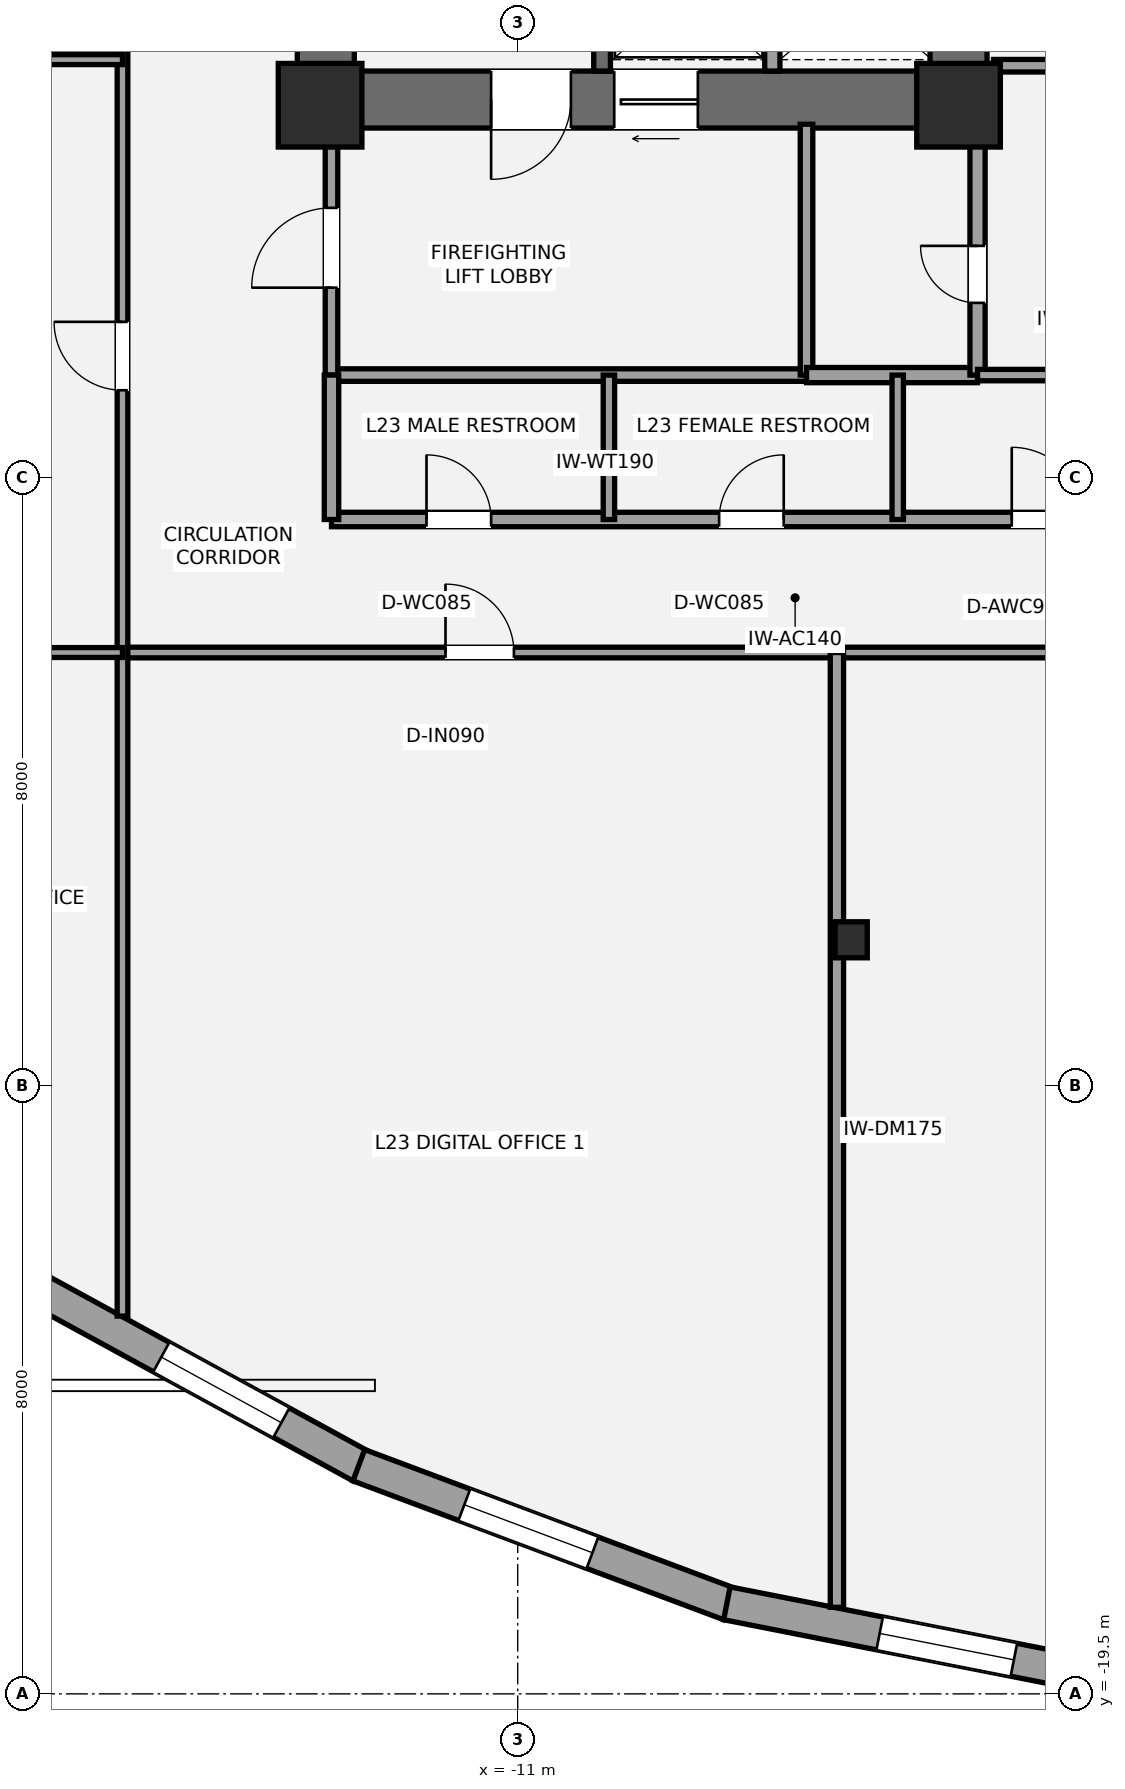
"""IFC4 building model, lengths in metres.
Left out: names, types, materials, properties, quantities, classifications, styles, units other than length and angle.
Written with IfcOpenShell. Run it as: python <this file> out.ifc"""

import sys

from ifc_helpers import new_model, si_unit, direction, frame, frame_2d, origin, origin_2d, place, context, subcontext, project, spatial, rectangle, i_section, extrude, element, fill, save


model = new_model("IFC4")
c1 = context("Model", 3, precision=1e-05, world=origin(), true_north=direction((0.0, 1.0)))
c2 = subcontext(c1, "Body", "Model", "MODEL_VIEW")
j1 = project(units=[si_unit("LENGTHUNIT", "METRE"), si_unit("PLANEANGLEUNIT", "RADIAN")], contexts=[c1])
p1 = place(None, origin())
s1 = spatial("IfcSite", under=j1, at=p1, CompositionType="ELEMENT")
p2 = place(p1, origin())
s2 = spatial("IfcBuilding", under=s1, at=p2, CompositionType="ELEMENT")
p3 = place(p2, frame((0.0, 0.0, 89.6)))
s3 = spatial("IfcBuildingStorey", under=s2, at=p3, CompositionType="ELEMENT", Elevation=89.6)
p4 = place(p3, frame((-13.525, 1.1, 0.0), z_axis=(0.0, 0.0, 1.0), x_axis=(0.0, 1.0, 0.0)))
e1 = element("IfcWall", 1, at=p4, inside=s3, PredefinedType="SHEAR", context=c2, shape_type="SweptSolid", body=[
    extrude(rectangle(XDim=8.65, YDim=0.75, at=frame_2d((4.325, 0.0))), origin(), (0.0, 0.0, 1.0), 3.5),
])
p5 = place(p3, frame((-4.825, 1.475, 0.0), z_axis=(0.0, 0.0, 1.0), x_axis=(-1.0, 0.0, 0.0)))
e2 = element("IfcWall", 2, at=p5, inside=s3, PredefinedType="SHEAR", context=c2, shape_type="SweptSolid", body=[
    extrude(rectangle(XDim=9.075, YDim=0.75, at=frame_2d((4.538, 0.0))), origin(), (0.0, 0.0, 1.0), 3.5),
])
p6 = place(p5, frame((5.475, 0.0, 0.0)))
e3 = element("IfcOpeningElement", 3, at=p6, cuts=e2, PredefinedType="OPENING", context=c2, shape_type="SweptSolid", body=[
    extrude(rectangle(XDim=1.05, YDim=2.15, at=frame_2d((0.525, 1.075))), frame((0.0, 0.385, 0.0), z_axis=(0.0, -1.0, 0.0), x_axis=(1.0, 0.0, 0.0)), (0.0, 0.0, 1.0), 0.77),
])
p7 = place(p5, frame((3.805, 0.0, 0.0)))
e4 = element("IfcOpeningElement", 4, at=p7, cuts=e2, PredefinedType="OPENING", context=c2, shape_type="SweptSolid", body=[
    extrude(rectangle(XDim=1.1, YDim=2.2, at=frame_2d((0.55, 1.1))), frame((0.0, 0.385, 0.0), z_axis=(0.0, -1.0, 0.0), x_axis=(1.0, 0.0, 0.0)), (0.0, 0.0, 1.0), 0.77),
])
p8 = place(p3, frame((-5.2, 1.1, 0.0), z_axis=(0.0, 0.0, 1.0), x_axis=(0.0, 1.0, 0.0)))
e5 = element("IfcWall", 5, at=p8, inside=s3, PredefinedType="SHEAR", context=c2, shape_type="SweptSolid", body=[
    extrude(rectangle(XDim=2.7, YDim=0.75, at=frame_2d((1.35, 0.0))), origin(), (0.0, 0.0, 1.0), 3.5),
])
p9 = place(p3, frame((-9.89, 1.85, 0.0), z_axis=(0.0, 0.0, 1.0), x_axis=(0.0, 1.0, 0.0)))
e6 = element("IfcWall", 6, at=p9, inside=s3, PredefinedType="SHEAR", context=c2, shape_type="SweptSolid", body=[
    extrude(rectangle(XDim=7.15, YDim=0.22, at=frame_2d((3.575, 0.0))), origin(), (0.0, 0.0, 1.0), 3.5),
])
for number, where, z_axis, x_axis in (
    (7, (-13.6, 1.4, 0.0), (0.0, 0.0, 1.0), (1.0, 0.0, 0.0)),
    (8, (-5.2, 1.4, 0.0), (0.0, 0.0, 1.0), (1.0, 0.0, 0.0)),
):
    element("IfcColumn", number, at=place(p3, frame(where, z_axis=z_axis, x_axis=x_axis)), inside=s3, PredefinedType="COLUMN", context=c2, shape_type="SweptSolid", body=[
        extrude(rectangle(XDim=1.1, YDim=1.1, at=origin_2d()), origin(), (0.0, 0.0, 1.0), 3.5),
    ])
p10 = place(p3, frame((-6.613, -9.579, 0.0), z_axis=(0.0, 0.0, 1.0), x_axis=(1.0, 0.0, 0.0)))
e9 = element("IfcColumn", 9, at=p10, inside=s3, PredefinedType="COLUMN", context=c2, shape_type="SweptSolid", body=[
    extrude(i_section(OverallWidth=0.424, OverallDepth=0.474, WebThickness=0.048, FlangeThickness=0.077, at=origin_2d()), origin(), (0.0, 0.0, 1.0), 3.5),
])
p11 = place(p3, frame((-13.062, -16.505, 0.0), z_axis=(0.0, 0.0, 1.0), x_axis=(-0.877445532469, 0.479676284123, 0.0)))
e10 = element("IfcWall", 10, at=p11, inside=s3, PredefinedType="STANDARD", context=c2, shape_type="SweptSolid", body=[
    extrude(rectangle(XDim=4.835, YDim=0.44, at=frame_2d((2.417, 0.0))), origin(), (0.0, 0.0, 1.0), 2.528),
])
p12 = place(p11, frame((1.194, 0.0, 0.65)))
e11 = element("IfcOpeningElement", 11, at=p12, cuts=e10, PredefinedType="OPENING", context=c2, shape_type="SweptSolid", body=[
    extrude(rectangle(XDim=1.8, YDim=1.7, at=frame_2d((0.9, 0.85))), frame((0.0, 0.23, 0.0), z_axis=(0.0, -1.0, 0.0), x_axis=(1.0, 0.0, 0.0)), (0.0, 0.0, 1.0), 0.46),
])
p13 = place(p3, frame((-8.213, -18.319, 0.0), z_axis=(0.0, 0.0, 1.0), x_axis=(-0.936473584013, 0.350738116613, 0.0)))
e12 = element("IfcWall", 12, at=p13, inside=s3, PredefinedType="STANDARD", context=c2, shape_type="SweptSolid", body=[
    extrude(rectangle(XDim=5.208, YDim=0.44, at=frame_2d((2.604, 0.0))), origin(), (0.0, 0.0, 1.0), 2.528),
])
p14 = place(p13, frame((1.926, 0.0, 0.65)))
e13 = element("IfcOpeningElement", 13, at=p14, cuts=e12, PredefinedType="OPENING", context=c2, shape_type="SweptSolid", body=[
    extrude(rectangle(XDim=1.8, YDim=1.7, at=frame_2d((0.9, 0.85))), frame((0.0, 0.23, 0.0), z_axis=(0.0, -1.0, 0.0), x_axis=(1.0, 0.0, 0.0)), (0.0, 0.0, 1.0), 0.46),
])
p15 = place(p3, frame((-2.805, -19.38, 0.0), z_axis=(0.0, 0.0, 1.0), x_axis=(-0.981185300561, 0.19306839711, 0.0)))
e14 = element("IfcWall", 14, at=p15, inside=s3, PredefinedType="STANDARD", context=c2, shape_type="SweptSolid", body=[
    extrude(rectangle(XDim=5.548, YDim=0.44, at=frame_2d((2.774, 0.0))), origin(), (0.0, 0.0, 1.0), 2.528),
])
p16 = place(p15, frame((1.699, 0.0, 0.65)))
e15 = element("IfcOpeningElement", 15, at=p16, cuts=e14, PredefinedType="OPENING", context=c2, shape_type="SweptSolid", body=[
    extrude(rectangle(XDim=1.8, YDim=1.7, at=frame_2d((0.9, 0.85))), frame((0.0, 0.23, 0.0), z_axis=(0.0, -1.0, 0.0), x_axis=(1.0, 0.0, 0.0)), (0.0, 0.0, 1.0), 0.46),
])
p17 = place(p3, frame((-13.45, -2.15, 0.0), z_axis=(0.0, 0.0, 1.0), x_axis=(1.0, 0.0, 0.0)))
e16 = element("IfcWall", 16, at=p17, inside=s3, PredefinedType="PARTITIONING", context=c2, shape_type="SweptSolid", body=[
    extrude(rectangle(XDim=6.25, YDim=0.165, at=frame_2d((3.125, 0.0))), origin(), (0.0, 0.0, 1.0), 3.31),
])
p18 = place(p3, frame((-13.45, -2.15, 0.0), z_axis=(0.0, 0.0, 1.0), x_axis=(0.0, 1.0, 0.0)))
e17 = element("IfcWall", 17, at=p18, inside=s3, PredefinedType="PARTITIONING", context=c2, shape_type="SweptSolid", body=[
    extrude(rectangle(XDim=3.3, YDim=0.165, at=frame_2d((1.65, 0.0))), origin(), (0.0, 0.0, 1.0), 2.763),
])
p19 = place(p18, frame((1.15, 0.0, 0.0)))
e18 = element("IfcOpeningElement", 18, at=p19, cuts=e17, PredefinedType="OPENING", context=c2, shape_type="SweptSolid", body=[
    extrude(rectangle(XDim=1.05, YDim=2.15, at=frame_2d((0.525, 1.075))), frame((0.0, 0.093, 0.0), z_axis=(0.0, -1.0, 0.0), x_axis=(1.0, 0.0, 0.0)), (0.0, 0.0, 1.0), 0.185),
])
p20 = place(p3, frame((-7.2, -2.15, 0.0), z_axis=(0.0, 0.0, 1.0), x_axis=(0.0, 1.0, 0.0)))
e19 = element("IfcWall", 19, at=p20, inside=s3, PredefinedType="PARTITIONING", context=c2, shape_type="SweptSolid", body=[
    extrude(rectangle(XDim=3.3, YDim=0.165, at=frame_2d((1.65, 0.0))), origin(), (0.0, 0.0, 1.0), 2.763),
])
p21 = place(p3, frame((-7.2, -2.15, 0.0), z_axis=(0.0, 0.0, 1.0), x_axis=(1.0, 0.0, 0.0)))
e20 = element("IfcWall", 20, at=p21, inside=s3, PredefinedType="SOLIDWALL", context=c2, shape_type="SweptSolid", body=[
    extrude(rectangle(XDim=2.25, YDim=0.2, at=frame_2d((1.125, 0.0))), origin(), (0.0, 0.0, 1.0), 2.763),
])
p22 = place(p3, frame((-4.95, -2.15, 0.0), z_axis=(0.0, 0.0, 1.0), x_axis=(0.0, 1.0, 0.0)))
e21 = element("IfcWall", 21, at=p22, inside=s3, PredefinedType="SOLIDWALL", context=c2, shape_type="SweptSolid", body=[
    extrude(rectangle(XDim=3.3, YDim=0.2, at=frame_2d((1.65, 0.0))), origin(), (0.0, 0.0, 1.0), 2.763),
])
p23 = place(p22, frame((0.95, 0.0, 0.0)))
e22 = element("IfcOpeningElement", 22, at=p23, cuts=e21, PredefinedType="OPENING", context=c2, shape_type="SweptSolid", body=[
    extrude(rectangle(XDim=0.75, YDim=2.1, at=frame_2d((0.375, 1.05))), frame((0.0, 0.11, 0.0), z_axis=(0.0, -1.0, 0.0), x_axis=(1.0, 0.0, 0.0)), (0.0, 0.0, 1.0), 0.22),
])
p24 = place(p3, frame((-7.65, 1.85, 0.0), z_axis=(0.0, 0.0, 1.0), x_axis=(0.0, 1.0, 0.0)))
e23 = element("IfcWall", 23, at=p24, inside=s3, PredefinedType="SOLIDWALL", context=c2, shape_type="SweptSolid", body=[
    extrude(rectangle(XDim=1.93, YDim=0.2, at=frame_2d((0.965, 0.0))), origin(), (0.0, 0.0, 1.0), 3.31),
])
p25 = place(p3, frame((-4.74, 1.92, 0.0), z_axis=(0.0, 0.0, 1.0), x_axis=(1.0, 0.0, 0.0)))
e24 = element("IfcWall", 24, at=p25, inside=s3, PredefinedType="PARTITIONING", context=c2, shape_type="SweptSolid", body=[
    extrude(rectangle(XDim=3.89, YDim=0.165, at=frame_2d((1.945, 0.0))), origin(), (0.0, 0.0, 1.0), 2.3),
])
p26 = place(p3, frame((-13.45, -4.05, 0.0), z_axis=(0.0, 0.0, 1.0), x_axis=(1.0, 0.0, 0.0)))
e25 = element("IfcWall", 25, at=p26, inside=s3, PredefinedType="PLUMBINGWALL", context=c2, shape_type="SweptSolid", body=[
    extrude(rectangle(XDim=11.35, YDim=0.19, at=frame_2d((5.675, 0.0))), origin(), (0.0, 0.0, 1.0), 2.763),
])
p27 = place(p26, frame((1.25, 0.0, 0.0)))
e26 = element("IfcOpeningElement", 26, at=p27, cuts=e25, PredefinedType="OPENING", context=c2, shape_type="SweptSolid", body=[
    extrude(rectangle(XDim=0.85, YDim=2.1, at=frame_2d((0.425, 1.05))), frame((0.0, 0.105, 0.0), z_axis=(0.0, -1.0, 0.0), x_axis=(1.0, 0.0, 0.0)), (0.0, 0.0, 1.0), 0.21),
])
p28 = place(p26, frame((5.1, 0.0, 0.0)))
e27 = element("IfcOpeningElement", 27, at=p28, cuts=e25, PredefinedType="OPENING", context=c2, shape_type="SweptSolid", body=[
    extrude(rectangle(XDim=0.85, YDim=2.1, at=frame_2d((0.425, 1.05))), frame((0.0, 0.105, 0.0), z_axis=(0.0, -1.0, 0.0), x_axis=(1.0, 0.0, 0.0)), (0.0, 0.0, 1.0), 0.21),
])
p29 = place(p26, frame((8.95, 0.0, 0.0)))
e28 = element("IfcOpeningElement", 28, at=p29, cuts=e25, PredefinedType="OPENING", context=c2, shape_type="SweptSolid", body=[
    extrude(rectangle(XDim=0.95, YDim=2.15, at=frame_2d((0.475, 1.075))), frame((0.0, 0.105, 0.0), z_axis=(0.0, -1.0, 0.0), x_axis=(1.0, 0.0, 0.0)), (0.0, 0.0, 1.0), 0.21),
])
p30 = place(p3, frame((-4.95, -2.15, 0.0), z_axis=(0.0, 0.0, 1.0), x_axis=(1.0, 0.0, 0.0)))
e29 = element("IfcWall", 29, at=p30, inside=s3, PredefinedType="PLUMBINGWALL", context=c2, shape_type="SweptSolid", body=[
    extrude(rectangle(XDim=2.85, YDim=0.15, at=frame_2d((1.425, 0.0))), origin(), (0.0, 0.0, 1.0), 3.31),
])
p31 = place(p3, frame((-13.45, -4.05, 0.0), z_axis=(0.0, 0.0, 1.0), x_axis=(0.0, 1.0, 0.0)))
e30 = element("IfcWall", 30, at=p31, inside=s3, PredefinedType="PLUMBINGWALL", context=c2, shape_type="SweptSolid", body=[
    extrude(rectangle(XDim=1.9, YDim=0.19, at=frame_2d((0.95, 0.0))), origin(), (0.0, 0.0, 1.0), 3.31),
])
p32 = place(p3, frame((-9.8, -4.05, 0.0), z_axis=(0.0, 0.0, 1.0), x_axis=(0.0, 1.0, 0.0)))
e31 = element("IfcWall", 31, at=p32, inside=s3, PredefinedType="PLUMBINGWALL", context=c2, shape_type="SweptSolid", body=[
    extrude(rectangle(XDim=1.9, YDim=0.15, at=frame_2d((0.95, 0.0))), origin(), (0.0, 0.0, 1.0), 3.31),
])
p33 = place(p3, frame((-6.0, -4.05, 0.0), z_axis=(0.0, 0.0, 1.0), x_axis=(0.0, 1.0, 0.0)))
e32 = element("IfcWall", 32, at=p33, inside=s3, PredefinedType="PLUMBINGWALL", context=c2, shape_type="SweptSolid", body=[
    extrude(rectangle(XDim=1.9, YDim=0.15, at=frame_2d((0.95, 0.0))), origin(), (0.0, 0.0, 1.0), 2.751),
])
p34 = place(p3, frame((-16.2, -5.8, 0.0), z_axis=(0.0, 0.0, 1.0), x_axis=(1.0, 0.0, 0.0)))
e33 = element("IfcWall", 33, at=p34, inside=s3, PredefinedType="PARTITIONING", context=c2, shape_type="SweptSolid", body=[
    extrude(rectangle(XDim=32.4, YDim=0.14, at=frame_2d((16.2, 0.0))), origin(), (0.0, 0.0, 1.0), 2.763),
])
p35 = place(p34, frame((4.25, 0.0, 0.0)))
e34 = element("IfcOpeningElement", 34, at=p35, cuts=e33, PredefinedType="OPENING", context=c2, shape_type="SweptSolid", body=[
    extrude(rectangle(XDim=0.9, YDim=2.1, at=frame_2d((0.45, 1.05))), frame((0.0, 0.08, 0.0), z_axis=(0.0, -1.0, 0.0), x_axis=(1.0, 0.0, 0.0)), (0.0, 0.0, 1.0), 0.16),
])
p36 = place(p34, frame((13.15, 0.0, 0.0)))
e35 = element("IfcOpeningElement", 35, at=p36, cuts=e33, PredefinedType="OPENING", context=c2, shape_type="SweptSolid", body=[
    extrude(rectangle(XDim=1.5, YDim=2.15, at=frame_2d((0.75, 1.075))), frame((0.0, 0.08, 0.0), z_axis=(0.0, -1.0, 0.0), x_axis=(1.0, 0.0, 0.0)), (0.0, 0.0, 1.0), 0.16),
])
p37 = place(p34, frame((21.45, 0.0, 0.0)))
e36 = element("IfcOpeningElement", 36, at=p37, cuts=e33, PredefinedType="OPENING", context=c2, shape_type="SweptSolid", body=[
    extrude(rectangle(XDim=0.9, YDim=2.1, at=frame_2d((0.45, 1.05))), frame((0.0, 0.08, 0.0), z_axis=(0.0, -1.0, 0.0), x_axis=(1.0, 0.0, 0.0)), (0.0, 0.0, 1.0), 0.16),
])
p38 = place(p34, frame((28.15, 0.0, 0.0)))
e37 = element("IfcOpeningElement", 37, at=p38, cuts=e33, PredefinedType="OPENING", context=c2, shape_type="SweptSolid", body=[
    extrude(rectangle(XDim=1.5, YDim=2.15, at=frame_2d((0.75, 1.075))), frame((0.0, 0.08, 0.0), z_axis=(0.0, -1.0, 0.0), x_axis=(1.0, 0.0, 0.0)), (0.0, 0.0, 1.0), 0.16),
])
p39 = place(p3, frame((-16.2, -14.53, 0.0), z_axis=(0.0, 0.0, 1.0), x_axis=(0.0, 1.0, 0.0)))
e38 = element("IfcWall", 38, at=p39, inside=s3, PredefinedType="PARTITIONING", context=c2, shape_type="SweptSolid", body=[
    extrude(rectangle(XDim=22.08, YDim=0.14, at=frame_2d((11.04, 0.0))), origin(), (0.0, 0.0, 1.0), 2.751),
])
p40 = place(p39, frame((12.18, 0.0, 0.0)))
e39 = element("IfcOpeningElement", 39, at=p40, cuts=e38, PredefinedType="OPENING", context=c2, shape_type="SweptSolid", body=[
    extrude(rectangle(XDim=0.9, YDim=2.1, at=frame_2d((0.45, 1.05))), frame((0.0, 0.08, 0.0), z_axis=(0.0, -1.0, 0.0), x_axis=(1.0, 0.0, 0.0)), (0.0, 0.0, 1.0), 0.16),
])
p41 = place(p39, frame((18.855, 0.0, 0.0)))
e40 = element("IfcOpeningElement", 40, at=p41, cuts=e38, PredefinedType="OPENING", context=c2, shape_type="SweptSolid", body=[
    extrude(rectangle(XDim=0.9, YDim=2.1, at=frame_2d((0.45, 1.05))), frame((0.0, 0.08, 0.0), z_axis=(0.0, -1.0, 0.0), x_axis=(1.0, 0.0, 0.0)), (0.0, 0.0, 1.0), 0.16),
])
p42 = place(p3, frame((-6.8, -18.361, 0.0), z_axis=(0.0, 0.0, 1.0), x_axis=(0.0, 1.0, 0.0)))
e41 = element("IfcWall", 41, at=p42, inside=s3, PredefinedType="PARTITIONING", context=c2, shape_type="SweptSolid", body=[
    extrude(rectangle(XDim=12.561, YDim=0.175, at=frame_2d((6.281, 0.0))), origin(), (0.0, 0.0, 1.0), 2.751),
])
p43 = place(p3, frame((-26.604, -5.8, 0.0), z_axis=(0.0, 0.0, 1.0), x_axis=(1.0, 0.0, 0.0)))
e42 = element("IfcWall", 42, at=p43, inside=s3, PredefinedType="PARTITIONING", context=c2, shape_type="SweptSolid", body=[
    extrude(rectangle(XDim=10.404, YDim=0.13, at=frame_2d((5.202, 0.0))), origin(), (0.0, 0.0, 1.0), 2.688),
])
p44 = place(p43, frame((0.75, 0.0, 0.0)))
e43 = element("IfcOpeningElement", 43, at=p44, cuts=e42, PredefinedType="OPENING", context=c2, shape_type="SweptSolid", body=[
    extrude(rectangle(XDim=0.9, YDim=2.1, at=frame_2d((0.45, 1.05))), frame((0.0, 0.075, 0.0), z_axis=(0.0, -1.0, 0.0), x_axis=(1.0, 0.0, 0.0)), (0.0, 0.0, 1.0), 0.15),
])
p45 = place(p3, frame((-28.392, 2.0, 0.0), z_axis=(0.0, 0.0, 1.0), x_axis=(1.0, 0.0, 0.0)))
e44 = element("IfcWall", 44, at=p45, inside=s3, PredefinedType="PARTITIONING", context=c2, shape_type="SweptSolid", body=[
    extrude(rectangle(XDim=12.192, YDim=0.13, at=frame_2d((6.096, 0.0))), origin(), (0.0, 0.0, 1.0), 2.751),
])
p46 = place(p12, origin())
e45 = element("IfcWindow", 45, at=p46, inside=s3, PartitioningType="SINGLE_PANEL", PredefinedType="WINDOW", context=c2, shape_type="SweptSolid", body=[
    extrude(rectangle(XDim=1.8, YDim=1.7, at=frame_2d((0.9, 0.85))), frame((0.0, -0.01, 0.0), z_axis=(0.0, -1.0, 0.0), x_axis=(1.0, 0.0, 0.0)), (0.0, 0.0, 1.0), 0.06),
])
fill(e11, e45)
p47 = place(p14, origin())
e46 = element("IfcWindow", 46, at=p47, inside=s3, PartitioningType="SINGLE_PANEL", PredefinedType="WINDOW", context=c2, shape_type="SweptSolid", body=[
    extrude(rectangle(XDim=1.8, YDim=1.7, at=frame_2d((0.9, 0.85))), frame((0.0, -0.01, 0.0), z_axis=(0.0, -1.0, 0.0), x_axis=(1.0, 0.0, 0.0)), (0.0, 0.0, 1.0), 0.06),
])
fill(e13, e46)
p48 = place(p16, origin())
e47 = element("IfcWindow", 47, at=p48, inside=s3, PartitioningType="SINGLE_PANEL", PredefinedType="WINDOW", context=c2, shape_type="SweptSolid", body=[
    extrude(rectangle(XDim=1.8, YDim=1.7, at=frame_2d((0.9, 0.85))), frame((0.0, -0.01, 0.0), z_axis=(0.0, -1.0, 0.0), x_axis=(1.0, 0.0, 0.0)), (0.0, 0.0, 1.0), 0.06),
])
fill(e15, e47)
p49 = place(p6, origin())
e48 = element("IfcDoor", 48, at=p49, inside=s3, OperationType="SINGLE_SWING_RIGHT", PredefinedType="DOOR", context=c2, shape_type="SweptSolid", body=[
    extrude(rectangle(XDim=1.05, YDim=2.15, at=frame_2d((0.525, 1.075))), frame((0.0, 0.025, 0.0), z_axis=(0.0, -1.0, 0.0), x_axis=(1.0, 0.0, 0.0)), (0.0, 0.0, 1.0), 0.05),
])
fill(e3, e48)
p50 = place(p19, origin())
e49 = element("IfcDoor", 49, at=p50, inside=s3, OperationType="SINGLE_SWING_LEFT", PredefinedType="DOOR", context=c2, shape_type="SweptSolid", body=[
    extrude(rectangle(XDim=1.05, YDim=2.15, at=frame_2d((0.525, 1.075))), frame((0.0, 0.025, 0.0), z_axis=(0.0, -1.0, 0.0), x_axis=(1.0, 0.0, 0.0)), (0.0, 0.0, 1.0), 0.05),
])
fill(e18, e49)
p51 = place(p23, origin())
e50 = element("IfcDoor", 50, at=p51, inside=s3, OperationType="SINGLE_SWING_RIGHT", PredefinedType="DOOR", context=c2, shape_type="SweptSolid", body=[
    extrude(rectangle(XDim=0.75, YDim=2.1, at=frame_2d((0.375, 1.05))), frame((0.0, 0.025, 0.0), z_axis=(0.0, -1.0, 0.0), x_axis=(1.0, 0.0, 0.0)), (0.0, 0.0, 1.0), 0.05),
])
fill(e22, e50)
p52 = place(p7, origin())
e51 = element("IfcDoor", 51, at=p52, inside=s3, OperationType="SLIDING_TO_LEFT", PredefinedType="DOOR", context=c2, shape_type="SweptSolid", body=[
    extrude(rectangle(XDim=1.1, YDim=2.2, at=frame_2d((0.55, 1.1))), frame((0.0, 0.025, 0.0), z_axis=(0.0, -1.0, 0.0), x_axis=(1.0, 0.0, 0.0)), (0.0, 0.0, 1.0), 0.05),
])
fill(e4, e51)
p53 = place(p27, origin())
e52 = element("IfcDoor", 52, at=p53, inside=s3, OperationType="SINGLE_SWING_LEFT", PredefinedType="DOOR", context=c2, shape_type="SweptSolid", body=[
    extrude(rectangle(XDim=0.85, YDim=2.1, at=frame_2d((0.425, 1.05))), frame((0.0, 0.025, 0.0), z_axis=(0.0, -1.0, 0.0), x_axis=(1.0, 0.0, 0.0)), (0.0, 0.0, 1.0), 0.05),
])
fill(e26, e52)
p54 = place(p28, origin())
e53 = element("IfcDoor", 53, at=p54, inside=s3, OperationType="SINGLE_SWING_RIGHT", PredefinedType="DOOR", context=c2, shape_type="SweptSolid", body=[
    extrude(rectangle(XDim=0.85, YDim=2.1, at=frame_2d((0.425, 1.05))), frame((0.0, 0.025, 0.0), z_axis=(0.0, -1.0, 0.0), x_axis=(1.0, 0.0, 0.0)), (0.0, 0.0, 1.0), 0.05),
])
fill(e27, e53)
p55 = place(p29, origin())
e54 = element("IfcDoor", 54, at=p55, inside=s3, OperationType="SINGLE_SWING_LEFT", PredefinedType="DOOR", context=c2, shape_type="SweptSolid", body=[
    extrude(rectangle(XDim=0.95, YDim=2.15, at=frame_2d((0.475, 1.075))), frame((0.0, 0.025, 0.0), z_axis=(0.0, -1.0, 0.0), x_axis=(1.0, 0.0, 0.0)), (0.0, 0.0, 1.0), 0.05),
])
fill(e28, e54)
p56 = place(p35, origin())
e55 = element("IfcDoor", 55, at=p56, inside=s3, OperationType="SINGLE_SWING_LEFT", PredefinedType="DOOR", context=c2, shape_type="SweptSolid", body=[
    extrude(rectangle(XDim=0.9, YDim=2.1, at=frame_2d((0.45, 1.05))), frame((0.0, 0.025, 0.0), z_axis=(0.0, -1.0, 0.0), x_axis=(1.0, 0.0, 0.0)), (0.0, 0.0, 1.0), 0.05),
])
fill(e34, e55)
p57 = place(p40, origin())
e56 = element("IfcDoor", 56, at=p57, inside=s3, OperationType="SINGLE_SWING_RIGHT", PredefinedType="DOOR", context=c2, shape_type="SweptSolid", body=[
    extrude(rectangle(XDim=0.9, YDim=2.1, at=frame_2d((0.45, 1.05))), frame((0.0, 0.025, 0.0), z_axis=(0.0, -1.0, 0.0), x_axis=(1.0, 0.0, 0.0)), (0.0, 0.0, 1.0), 0.05),
])
fill(e39, e56)
save(model, sys.argv[1])
